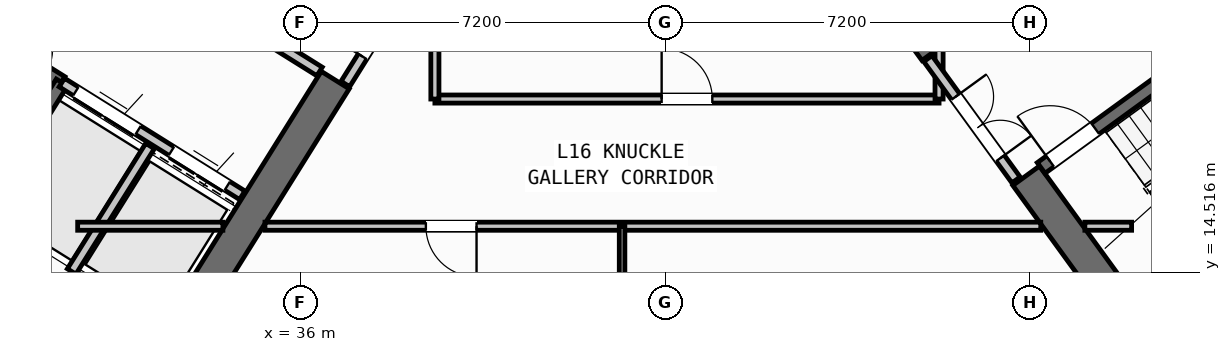
"""IFC4 building model, lengths in metres.
Left out: names, types, materials, properties, quantities, classifications, styles, units other than length and angle.
Written with IfcOpenShell. Run it as: python <this file> out.ifc"""

import sys

from ifc_helpers import new_model, si_unit, direction, frame, frame_2d, origin, place, context, subcontext, project, spatial, rectangle, extrude, source, transform, mapped, element, fill, save


model = new_model("IFC4")
c1 = context("Model", 3, precision=1e-05, world=origin(), true_north=direction((0.0, 1.0)))
c2 = subcontext(c1, "Body", "Model", "MODEL_VIEW")
j1 = project(units=[si_unit("LENGTHUNIT", "METRE"), si_unit("PLANEANGLEUNIT", "RADIAN")], contexts=[c1])
p1 = place(None, origin())
s1 = spatial("IfcSite", under=j1, at=p1, CompositionType="ELEMENT")
p2 = place(p1, origin())
s2 = spatial("IfcBuilding", under=s1, at=p2, CompositionType="ELEMENT")
p3 = place(p2, frame((0.0, 0.0, 63.6)))
s3 = spatial("IfcBuildingStorey", under=s2, at=p3, CompositionType="ELEMENT", Elevation=63.6)
p4 = place(p3, frame((33.409, 12.45, 0.0), z_axis=(0.0, 0.0, 1.0), x_axis=(-0.848051132073, 0.529914405721, 0.0)))
e1 = element("IfcWall", 1, at=p4, inside=s3, PredefinedType="SHEAR", context=c2, shape_type="SweptSolid", body=[
    extrude(rectangle(XDim=13.24, YDim=0.65, at=frame_2d((6.62, 0.0))), origin(), (0.0, 0.0, 1.0), 3.35),
])
p5 = place(p3, frame((36.683, 18.304, 0.0), z_axis=(0.0, 0.0, 1.0), x_axis=(-0.529899109053, -0.848060690178, 0.0)))
e2 = element("IfcWall", 2, at=p5, inside=s3, PredefinedType="SHEAR", context=c2, shape_type="SweptSolid", body=[
    extrude(rectangle(XDim=6.375, YDim=0.65, at=frame_2d((3.188, 0.0))), origin(), (0.0, 0.0, 1.0), 3.35),
])
p6 = place(p3, frame((52.318, 13.11, 0.0), z_axis=(0.0, 0.0, 1.0), x_axis=(0.809019445368, 0.587781878776, 0.0)))
e3 = element("IfcWall", 3, at=p6, inside=s3, PredefinedType="SHEAR", context=c2, shape_type="SweptSolid", body=[
    extrude(rectangle(XDim=12.44, YDim=0.65, at=frame_2d((6.22, 0.0))), origin(), (0.0, 0.0, 1.0), 3.35),
])
p7 = place(p3, frame((52.39, 13.564, 0.0), z_axis=(0.0, 0.0, 1.0), x_axis=(-0.58779688989, 0.809008539037, 0.0)))
e4 = element("IfcWall", 4, at=p7, inside=s3, PredefinedType="SHEAR", context=c2, shape_type="SweptSolid", body=[
    extrude(rectangle(XDim=3.525, YDim=0.65, at=frame_2d((1.763, 0.0))), origin(), (0.0, 0.0, 1.0), 3.35),
])
p8 = place(p3, frame((48.526, 18.884, 0.0), z_axis=(0.0, 0.0, 1.0), x_axis=(-0.58777996584, 0.809020835181, 0.0)))
e5 = element("IfcWall", 5, at=p8, inside=s3, PredefinedType="SHEAR", context=c2, shape_type="SweptSolid", body=[
    extrude(rectangle(XDim=6.375, YDim=0.65, at=frame_2d((3.188, 0.0))), origin(), (0.0, 0.0, 1.0), 3.35),
])
p9 = place(p3, frame((31.28, 18.261, 0.0), z_axis=(0.0, 0.0, 1.0), x_axis=(-0.848051618787, 0.529913626805, 0.0)))
e6 = element("IfcWall", 6, at=p9, inside=s3, PredefinedType="SHEAR", context=c2, shape_type="SweptSolid", body=[
    extrude(rectangle(XDim=7.46, YDim=0.26, at=frame_2d((3.73, 0.0))), origin(), (0.0, 0.0, 1.0), 3.35),
])
p10 = place(p9, frame((0.36, 0.0, 0.0)))
e7 = element("IfcOpeningElement", 7, at=p10, cuts=e6, PredefinedType="OPENING", context=c2, shape_type="SweptSolid", body=[
    extrude(rectangle(XDim=0.86, YDim=2.05, at=frame_2d((0.43, 1.025))), frame((0.0, 0.14, 0.0), z_axis=(0.0, -1.0, 0.0), x_axis=(1.0, 0.0, 0.0)), (0.0, 0.0, 1.0), 0.28),
])
p11 = place(p3, frame((31.288, 18.256, 0.0), z_axis=(0.0, 0.0, 1.0), x_axis=(-0.529943379326, -0.848033026897, 0.0)))
e8 = element("IfcWall", 8, at=p11, inside=s3, PredefinedType="SHEAR", context=c2, shape_type="SweptSolid", body=[
    extrude(rectangle(XDim=3.16, YDim=0.26, at=frame_2d((1.58, 0.0))), origin(), (0.0, 0.0, 1.0), 3.35),
])
p12 = place(p3, frame((34.848, 16.031, 0.0), z_axis=(0.0, 0.0, 1.0), x_axis=(-0.848044042236, 0.529925751807, 0.0)))
e9 = element("IfcWall", 9, at=p12, inside=s3, PredefinedType="STANDARD", context=c2, shape_type="SweptSolid", body=[
    extrude(rectangle(XDim=4.198, YDim=0.2, at=frame_2d((2.099, 0.0))), origin(), (0.0, 0.0, 1.0), 3.34),
])
p13 = place(p12, frame((0.348, 0.0, 0.0)))
e10 = element("IfcOpeningElement", 10, at=p13, cuts=e9, PredefinedType="OPENING", context=c2, shape_type="SweptSolid", body=[
    extrude(rectangle(XDim=1.3, YDim=2.2, at=frame_2d((0.65, 1.1))), frame((0.0, 0.11, 0.0), z_axis=(0.0, -1.0, 0.0), x_axis=(1.0, 0.0, 0.0)), (0.0, 0.0, 1.0), 0.22),
])
p14 = place(p12, frame((2.423, 0.0, 0.0)))
e11 = element("IfcOpeningElement", 11, at=p14, cuts=e9, PredefinedType="OPENING", context=c2, shape_type="SweptSolid", body=[
    extrude(rectangle(XDim=1.45, YDim=2.25, at=frame_2d((0.725, 1.125))), frame((0.0, 0.11, 0.0), z_axis=(0.0, -1.0, 0.0), x_axis=(1.0, 0.0, 0.0)), (0.0, 0.0, 1.0), 0.22),
])
p15 = place(p3, frame((36.374, 18.474, 0.0), z_axis=(0.0, 0.0, 1.0), x_axis=(-0.848051071577, 0.529914502535, 0.0)))
e12 = element("IfcWall", 12, at=p15, inside=s3, PredefinedType="STANDARD", context=c2, shape_type="SweptSolid", body=[
    extrude(rectangle(XDim=5.718, YDim=0.2, at=frame_2d((2.859, 0.0))), origin(), (0.0, 0.0, 1.0), 3.34),
])
p16 = place(p15, frame((2.498, 0.0, 0.0)))
e13 = element("IfcOpeningElement", 13, at=p16, cuts=e12, PredefinedType="OPENING", context=c2, shape_type="SweptSolid", body=[
    extrude(rectangle(XDim=1.15, YDim=2.1, at=frame_2d((0.575, 1.05))), frame((0.0, 0.11, 0.0), z_axis=(0.0, -1.0, 0.0), x_axis=(1.0, 0.0, 0.0)), (0.0, 0.0, 1.0), 0.22),
])
p17 = place(p3, frame((33.029, 17.003, 0.0), z_axis=(0.0, 0.0, 1.0), x_axis=(-0.529916267533, -0.848049968695, 0.0)))
e14 = element("IfcWall", 14, at=p17, inside=s3, PredefinedType="STANDARD", context=c2, shape_type="SweptSolid", body=[
    extrude(rectangle(XDim=2.92, YDim=0.2, at=frame_2d((1.46, 0.0))), origin(), (0.0, 0.0, 1.0), 3.34),
])
p18 = place(p3, frame((52.472, 14.013, 0.0), z_axis=(0.0, 0.0, 1.0), x_axis=(0.809028366311, 0.587769599847, 0.0)))
e15 = element("IfcWall", 15, at=p18, inside=s3, PredefinedType="SHEAR", context=c2, shape_type="SweptSolid", body=[
    extrude(rectangle(XDim=7.33, YDim=0.26, at=frame_2d((3.665, 0.0))), origin(), (0.0, 0.0, 1.0), 3.35),
])
p19 = place(p3, frame((50.615, 16.57, 0.0), z_axis=(0.0, 0.0, 1.0), x_axis=(0.809028366311, 0.587769599847, 0.0)))
e16 = element("IfcWall", 16, at=p19, inside=s3, PredefinedType="SHEAR", context=c2, shape_type="SweptSolid", body=[
    extrude(rectangle(XDim=7.33, YDim=0.26, at=frame_2d((3.665, 0.0))), origin(), (0.0, 0.0, 1.0), 3.35),
])
p20 = place(p19, frame((0.22, 0.0, 0.0)))
e17 = element("IfcOpeningElement", 17, at=p20, cuts=e16, PredefinedType="OPENING", context=c2, shape_type="SweptSolid", body=[
    extrude(rectangle(XDim=1.1, YDim=2.1, at=frame_2d((0.55, 1.05))), frame((0.0, 0.14, 0.0), z_axis=(0.0, -1.0, 0.0), x_axis=(1.0, 0.0, 0.0)), (0.0, 0.0, 1.0), 0.28),
])
p21 = place(p3, frame((32.164, 10.374, 0.0), z_axis=(0.0, 0.0, 1.0), x_axis=(-0.848044107957, 0.529925646633, 0.0)))
e18 = element("IfcWall", 18, at=p21, inside=s3, PredefinedType="PARTITIONING", context=c2, shape_type="SweptSolid", body=[
    extrude(rectangle(XDim=15.57, YDim=0.16, at=frame_2d((7.785, 0.0))), origin(), (0.0, 0.0, 1.0), 3.34),
])
p22 = place(p21, frame((10.83, 0.0, 0.0)))
e19 = element("IfcOpeningElement", 19, at=p22, cuts=e18, PredefinedType="OPENING", context=c2, shape_type="SweptSolid", body=[
    extrude(rectangle(XDim=1.0, YDim=2.1, at=frame_2d((0.5, 1.05))), frame((0.0, 0.09, 0.0), z_axis=(0.0, -1.0, 0.0), x_axis=(1.0, 0.0, 0.0)), (0.0, 0.0, 1.0), 0.18),
])
p23 = place(p3, frame((38.451, 20.737, 0.0), z_axis=(0.0, 0.0, 1.0), x_axis=(-0.529924799939, -0.848044637038, 0.0)))
e20 = element("IfcWall", 20, at=p23, inside=s3, PredefinedType="STANDARD", context=c2, shape_type="SweptSolid", body=[
    extrude(rectangle(XDim=2.96, YDim=0.2, at=frame_2d((1.48, 0.0))), origin(), (0.0, 0.0, 1.0), 3.34),
])
p24 = place(p23, frame((1.46, 0.0, 0.0)))
e21 = element("IfcOpeningElement", 21, at=p24, cuts=e20, PredefinedType="OPENING", context=c2, shape_type="SweptSolid", body=[
    extrude(rectangle(XDim=0.86, YDim=2.05, at=frame_2d((0.43, 1.025))), frame((0.0, 0.11, 0.0), z_axis=(0.0, -1.0, 0.0), x_axis=(1.0, 0.0, 0.0)), (0.0, 0.0, 1.0), 0.22),
])
p25 = place(p3, frame((31.6, 15.42, 0.0), z_axis=(0.0, 0.0, 1.0), x_axis=(1.0, 0.0, 0.0)))
e22 = element("IfcWall", 22, at=p25, inside=s3, PredefinedType="PARTITIONING", context=c2, shape_type="SweptSolid", body=[
    extrude(rectangle(XDim=2.866, YDim=0.16, at=frame_2d((1.433, 0.0))), origin(), (0.0, 0.0, 1.0), 3.34),
])
p26 = place(p3, frame((35.296, 15.42, 0.0), z_axis=(0.0, 0.0, 1.0), x_axis=(1.0, 0.0, 0.0)))
e23 = element("IfcWall", 23, at=p26, inside=s3, PredefinedType="PARTITIONING", context=c2, shape_type="SweptSolid", body=[
    extrude(rectangle(XDim=15.311, YDim=0.16, at=frame_2d((7.655, 0.0))), origin(), (0.0, 0.0, 1.0), 3.34),
])
p27 = place(p26, frame((3.176, 0.0, 0.0)))
e24 = element("IfcOpeningElement", 24, at=p27, cuts=e23, PredefinedType="OPENING", context=c2, shape_type="SweptSolid", body=[
    extrude(rectangle(XDim=1.0, YDim=2.1, at=frame_2d((0.5, 1.05))), frame((0.0, 0.09, 0.0), z_axis=(0.0, -1.0, 0.0), x_axis=(1.0, 0.0, 0.0)), (0.0, 0.0, 1.0), 0.18),
])
p28 = place(p3, frame((51.477, 15.42, 0.0), z_axis=(0.0, 0.0, 1.0), x_axis=(1.0, 0.0, 0.0)))
e25 = element("IfcWall", 25, at=p28, inside=s3, PredefinedType="PARTITIONING", context=c2, shape_type="SweptSolid", body=[
    extrude(rectangle(XDim=0.923, YDim=0.16, at=frame_2d((0.461, 0.0))), origin(), (0.0, 0.0, 1.0), 3.34),
])
p29 = place(p3, frame((38.65, 17.93, 0.0), z_axis=(0.0, 0.0, 1.0), x_axis=(1.0, 0.0, 0.0)))
e26 = element("IfcWall", 26, at=p29, inside=s3, PredefinedType="PARTITIONING", context=c2, shape_type="SweptSolid", body=[
    extrude(rectangle(XDim=9.95, YDim=0.16, at=frame_2d((4.975, 0.0))), origin(), (0.0, 0.0, 1.0), 3.34),
])
p30 = place(p29, frame((4.475, 0.0, 0.0)))
e27 = element("IfcOpeningElement", 27, at=p30, cuts=e26, PredefinedType="OPENING", context=c2, shape_type="SweptSolid", body=[
    extrude(rectangle(XDim=1.0, YDim=2.1, at=frame_2d((0.5, 1.05))), frame((0.0, 0.09, 0.0), z_axis=(0.0, -1.0, 0.0), x_axis=(1.0, 0.0, 0.0)), (0.0, 0.0, 1.0), 0.18),
])
p31 = place(p3, frame((38.65, 17.93, 0.0), z_axis=(0.0, 0.0, 1.0), x_axis=(0.0, 1.0, 0.0)))
e28 = element("IfcWall", 28, at=p31, inside=s3, PredefinedType="PARTITIONING", context=c2, shape_type="SweptSolid", body=[
    extrude(rectangle(XDim=2.857, YDim=0.16, at=frame_2d((1.428, 0.0))), origin(), (0.0, 0.0, 1.0), 3.34),
])
p32 = place(p3, frame((48.6, 17.93, 0.0), z_axis=(0.0, 0.0, 1.0), x_axis=(0.0, 1.0, 0.0)))
e29 = element("IfcWall", 29, at=p32, inside=s3, PredefinedType="PARTITIONING", context=c2, shape_type="SweptSolid", body=[
    extrude(rectangle(XDim=0.993, YDim=0.16, at=frame_2d((0.496, 0.0))), origin(), (0.0, 0.0, 1.0), 3.34),
])
p33 = place(p3, frame((50.119, 16.333, 0.0), z_axis=(0.0, 0.0, 1.0), x_axis=(-0.587749856981, 0.809042709391, 0.0)))
e30 = element("IfcWall", 30, at=p33, inside=s3, PredefinedType="STANDARD", context=c2, shape_type="SweptSolid", body=[
    extrude(rectangle(XDim=2.96, YDim=0.2, at=frame_2d((1.48, 0.0))), origin(), (0.0, 0.0, 1.0), 3.34),
])
p34 = place(p33, frame((0.53, 0.0, 0.0)))
e31 = element("IfcOpeningElement", 31, at=p34, cuts=e30, PredefinedType="OPENING", context=c2, shape_type="SweptSolid", body=[
    extrude(rectangle(XDim=1.5, YDim=2.15, at=frame_2d((0.75, 1.075))), frame((0.0, 0.11, 0.0), z_axis=(0.0, -1.0, 0.0), x_axis=(1.0, 0.0, 0.0)), (0.0, 0.0, 1.0), 0.22),
])
p35 = place(p3, frame((42.344, 1.96, 0.0), z_axis=(0.0, 0.0, 1.0), x_axis=(0.0, 1.0, 0.0)))
e32 = element("IfcWall", 32, at=p35, inside=s3, PredefinedType="PARTITIONING", context=c2, shape_type="SweptSolid", body=[
    extrude(rectangle(XDim=13.46, YDim=0.11, at=frame_2d((6.73, 0.0))), origin(), (0.0, 0.0, 1.0), 3.34),
])
p36 = place(p35, frame((5.44, 0.0, 0.0)))
e33 = element("IfcOpeningElement", 33, at=p36, cuts=e32, PredefinedType="OPENING", context=c2, shape_type="SweptSolid", body=[
    extrude(rectangle(XDim=0.92, YDim=2.08, at=frame_2d((0.46, 1.04))), frame((0.0, 0.065, 0.0), z_axis=(0.0, -1.0, 0.0), x_axis=(1.0, 0.0, 0.0)), (0.0, 0.0, 1.0), 0.13),
])
p37 = place(p35, frame((10.67, 0.0, 0.0)))
e34 = element("IfcOpeningElement", 34, at=p37, cuts=e32, PredefinedType="OPENING", context=c2, shape_type="SweptSolid", body=[
    extrude(rectangle(XDim=0.88, YDim=2.08, at=frame_2d((0.44, 1.04))), frame((0.0, 0.065, 0.0), z_axis=(0.0, -1.0, 0.0), x_axis=(1.0, 0.0, 0.0)), (0.0, 0.0, 1.0), 0.13),
])
m1 = source(origin(), c2, "Body", "SweptSolid", [
    extrude(rectangle(XDim=1.3, YDim=2.2, at=frame_2d((0.65, 1.1))), frame((0.0, 0.025, 0.0), z_axis=(0.0, -1.0, 0.0), x_axis=(1.0, 0.0, 0.0)), (0.0, 0.0, 1.0), 0.05),
])
p38 = place(p13, origin())
e35 = element("IfcDoor", 35, at=p38, inside=s3, OperationType="DOUBLE_DOOR_SLIDING", PredefinedType="DOOR", context=c2, shape_type="MappedRepresentation", body=[
    mapped(m1, transform((0.0, 0.0, 0.0), scale=1.0)),
])
fill(e10, e35)
m2 = source(origin(), c2, "Body", "SweptSolid", [
    extrude(rectangle(XDim=1.45, YDim=2.25, at=frame_2d((0.725, 1.125))), frame((0.0, 0.025, 0.0), z_axis=(0.0, -1.0, 0.0), x_axis=(1.0, 0.0, 0.0)), (0.0, 0.0, 1.0), 0.05),
])
p39 = place(p14, origin())
e36 = element("IfcDoor", 36, at=p39, inside=s3, OperationType="DOUBLE_DOOR_SLIDING", PredefinedType="DOOR", context=c2, shape_type="MappedRepresentation", body=[
    mapped(m2, transform((0.0, 0.0, 0.0), scale=1.0)),
])
fill(e11, e36)
m3 = source(origin(), c2, "Body", "SweptSolid", [
    extrude(rectangle(XDim=1.1, YDim=2.1, at=frame_2d((0.55, 1.05))), frame((0.0, 0.025, 0.0), z_axis=(0.0, -1.0, 0.0), x_axis=(1.0, 0.0, 0.0)), (0.0, 0.0, 1.0), 0.05),
])
p40 = place(p20, origin())
e37 = element("IfcDoor", 37, at=p40, inside=s3, OperationType="SINGLE_SWING_LEFT", PredefinedType="DOOR", context=c2, shape_type="MappedRepresentation", body=[
    mapped(m3, transform((0.0, 0.0, 0.0), scale=1.0)),
])
fill(e17, e37)
m4 = source(origin(), c2, "Body", "SweptSolid", [
    extrude(rectangle(XDim=1.0, YDim=2.1, at=frame_2d((0.5, 1.05))), frame((0.0, 0.025, 0.0), z_axis=(0.0, -1.0, 0.0), x_axis=(1.0, 0.0, 0.0)), (0.0, 0.0, 1.0), 0.05),
])
p41 = place(p30, origin())
e38 = element("IfcDoor", 38, at=p41, inside=s3, OperationType="SINGLE_SWING_LEFT", PredefinedType="DOOR", context=c2, shape_type="MappedRepresentation", body=[
    mapped(m4, transform((0.0, 0.0, 0.0), scale=1.0)),
])
fill(e27, e38)
m5 = source(origin(), c2, "Body", "SweptSolid", [
    extrude(rectangle(XDim=0.86, YDim=2.05, at=frame_2d((0.43, 1.025))), frame((0.0, 0.025, 0.0), z_axis=(0.0, -1.0, 0.0), x_axis=(1.0, 0.0, 0.0)), (0.0, 0.0, 1.0), 0.05),
])
p42 = place(p24, frame((0.86, 0.0, 0.0), z_axis=(0.0, 0.0, 1.0), x_axis=(-1.0, 0.0, 0.0)))
e39 = element("IfcDoor", 39, at=p42, inside=s3, OperationType="SINGLE_SWING_LEFT", PredefinedType="DOOR", context=c2, shape_type="MappedRepresentation", body=[
    mapped(m5, transform((0.0, 0.0, 0.0), scale=1.0)),
])
fill(e21, e39)
m6 = source(origin(), c2, "Body", "SweptSolid", [
    extrude(rectangle(XDim=1.5, YDim=2.15, at=frame_2d((0.75, 1.075))), frame((0.0, 0.025, 0.0), z_axis=(0.0, -1.0, 0.0), x_axis=(1.0, 0.0, 0.0)), (0.0, 0.0, 1.0), 0.05),
])
p43 = place(p34, frame((1.5, 0.0, 0.0), z_axis=(0.0, 0.0, 1.0), x_axis=(-1.0, 0.0, 0.0)))
e40 = element("IfcDoor", 40, at=p43, inside=s3, OperationType="DOUBLE_DOOR_SINGLE_SWING", PredefinedType="DOOR", context=c2, shape_type="MappedRepresentation", body=[
    mapped(m6, transform((0.0, 0.0, 0.0), scale=1.0)),
])
fill(e31, e40)
p44 = place(p27, frame((1.0, 0.0, 0.0), z_axis=(0.0, 0.0, 1.0), x_axis=(-1.0, 0.0, 0.0)))
e41 = element("IfcDoor", 41, at=p44, inside=s3, OperationType="SINGLE_SWING_LEFT", PredefinedType="DOOR", context=c2, shape_type="MappedRepresentation", body=[
    mapped(m4, transform((0.0, 0.0, 0.0), scale=1.0)),
])
fill(e24, e41)
save(model, sys.argv[1])
